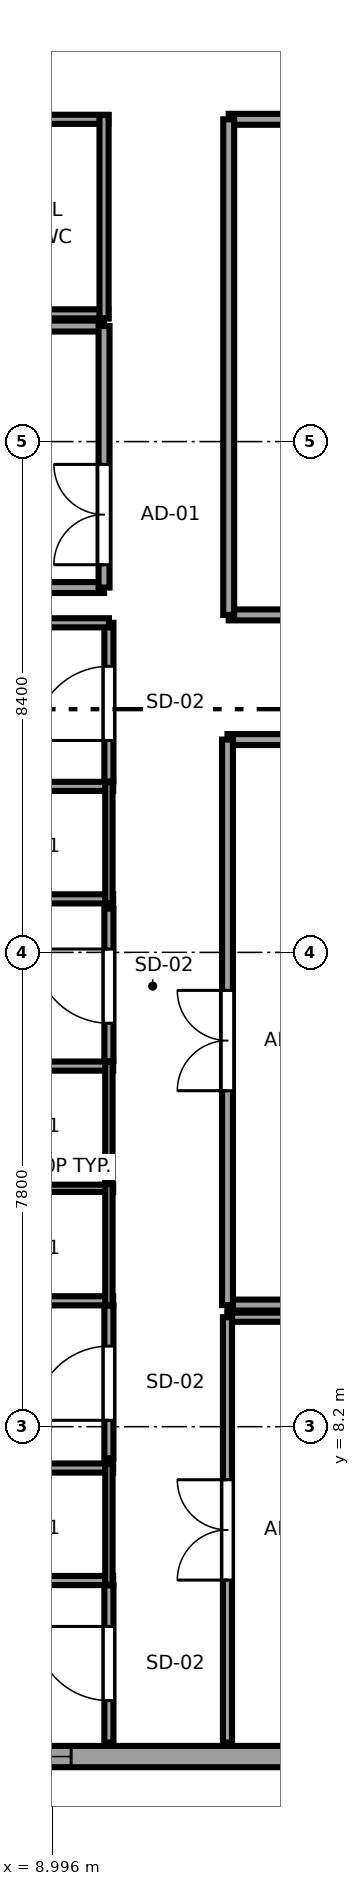
"""IFC4 building model, lengths in metres.
Left out: names, types, materials, properties, quantities, classifications, styles, units other than length and angle.
Written with IfcOpenShell. Run it as: python <this file> out.ifc"""

import sys

from ifc_helpers import new_model, si_unit, direction, frame, frame_2d, origin, place, context, subcontext, project, spatial, rectangle, extrude, source, transform, mapped, element, fill, save


model = new_model("IFC4")
c1 = context("Model", 3, precision=1e-05, world=origin(), true_north=direction((0.0, 1.0)))
c2 = subcontext(c1, "Body", "Model", "MODEL_VIEW")
j1 = project(units=[si_unit("LENGTHUNIT", "METRE"), si_unit("PLANEANGLEUNIT", "RADIAN")], contexts=[c1])
p1 = place(None, origin())
s1 = spatial("IfcSite", under=j1, at=p1, CompositionType="ELEMENT")
p2 = place(p1, origin())
s2 = spatial("IfcBuilding", under=s1, at=p2, CompositionType="ELEMENT")
p3 = place(p2, frame((0.0, 0.0, 241.65)))
s3 = spatial("IfcBuildingStorey", under=s2, at=p3, CompositionType="ELEMENT", Elevation=241.65)
p4 = place(p3, frame((7.017, 2.775, 0.0), z_axis=(0.0, 0.0, 1.0), x_axis=(1.0, 0.0, 0.0)))
e1 = element("IfcWall", 1, at=p4, inside=s3, PredefinedType="SOLIDWALL", context=c2, shape_type="SweptSolid", body=[
    extrude(rectangle(XDim=8.008, YDim=0.35, at=frame_2d((4.004, 0.0))), origin(), (0.0, 0.0, 1.0), 3.37),
])
p5 = place(p4, frame((0.791, 0.0, 0.62)))
e2 = element("IfcOpeningElement", 2, at=p5, cuts=e1, PredefinedType="OPENING", context=c2, shape_type="SweptSolid", body=[
    extrude(rectangle(XDim=1.5, YDim=1.55, at=frame_2d((0.75, 0.775))), frame((0.0, 0.185, 0.0), z_axis=(0.0, -1.0, 0.0), x_axis=(1.0, 0.0, 0.0)), (0.0, 0.0, 1.0), 0.37),
])
for number, where, z_axis, x_axis in (
    (3, (7.41, 5.67, 0.0), (0.0, 0.0, 1.0), (1.0, 0.0, 0.0)),
    (4, (7.41, 7.52, 0.0), (0.0, 0.0, 1.0), (1.0, 0.0, 0.0)),
):
    element("IfcWall", number, at=place(p3, frame(where, z_axis=z_axis, x_axis=x_axis)), inside=s3, PredefinedType="PARTITIONING", context=c2, shape_type="SweptSolid", body=[
        extrude(rectangle(XDim=2.59, YDim=0.15, at=frame_2d((1.295, 0.0))), origin(), (0.0, 0.0, 1.0), 3.37),
    ])
p6 = place(p3, frame((9.93, 5.6, 0.0), z_axis=(0.0, 0.0, 1.0), x_axis=(0.0, 1.0, 0.0)))
e5 = element("IfcWall", 5, at=p6, inside=s3, PredefinedType="PLUMBINGWALL", context=c2, shape_type="SweptSolid", body=[
    extrude(rectangle(XDim=1.99, YDim=0.12, at=frame_2d((0.995, 0.0))), origin(), (0.0, 0.0, 1.0), 3.37),
])
p7 = place(p3, frame((7.41, 10.27, 0.0), z_axis=(0.0, 0.0, 1.0), x_axis=(1.0, 0.0, 0.0)))
e6 = element("IfcWall", 6, at=p7, inside=s3, PredefinedType="PARTITIONING", context=c2, shape_type="SweptSolid", body=[
    extrude(rectangle(XDim=2.59, YDim=0.15, at=frame_2d((1.295, 0.0))), origin(), (0.0, 0.0, 1.0), 3.37),
])
p8 = place(p3, frame((7.41, 12.12, 0.0), z_axis=(0.0, 0.0, 1.0), x_axis=(1.0, 0.0, 0.0)))
e7 = element("IfcWall", 7, at=p8, inside=s3, PredefinedType="PLUMBINGWALL", context=c2, shape_type="SweptSolid", body=[
    extrude(rectangle(XDim=2.59, YDim=0.12, at=frame_2d((1.295, 0.0))), origin(), (0.0, 0.0, 1.0), 3.37),
])
p9 = place(p3, frame((9.93, 10.2, 0.0), z_axis=(0.0, 0.0, 1.0), x_axis=(0.0, 1.0, 0.0)))
e8 = element("IfcWall", 8, at=p9, inside=s3, PredefinedType="PLUMBINGWALL", context=c2, shape_type="SweptSolid", body=[
    extrude(rectangle(XDim=1.99, YDim=0.12, at=frame_2d((0.995, 0.0))), origin(), (0.0, 0.0, 1.0), 3.37),
])
p10 = place(p3, frame((7.41, 14.13, 0.0), z_axis=(0.0, 0.0, 1.0), x_axis=(1.0, 0.0, 0.0)))
e9 = element("IfcWall", 9, at=p10, inside=s3, PredefinedType="PARTITIONING", context=c2, shape_type="SweptSolid", body=[
    extrude(rectangle(XDim=2.59, YDim=0.15, at=frame_2d((1.295, 0.0))), origin(), (0.0, 0.0, 1.0), 3.37),
])
p11 = place(p3, frame((9.93, 12.21, 0.0), z_axis=(0.0, 0.0, 1.0), x_axis=(0.0, 1.0, 0.0)))
e10 = element("IfcWall", 10, at=p11, inside=s3, PredefinedType="PLUMBINGWALL", context=c2, shape_type="SweptSolid", body=[
    extrude(rectangle(XDim=1.99, YDim=0.12, at=frame_2d((0.995, 0.0))), origin(), (0.0, 0.0, 1.0), 3.37),
])
p12 = place(p3, frame((3.005, 16.88, 0.0), z_axis=(0.0, 0.0, 1.0), x_axis=(1.0, 0.0, 0.0)))
e11 = element("IfcWall", 11, at=p12, inside=s3, PredefinedType="PARTITIONING", context=c2, shape_type="SweptSolid", body=[
    extrude(rectangle(XDim=6.995, YDim=0.15, at=frame_2d((3.498, 0.0))), origin(), (0.0, 0.0, 1.0), 3.37),
])
p13 = place(p3, frame((7.41, 18.73, 0.0), z_axis=(0.0, 0.0, 1.0), x_axis=(1.0, 0.0, 0.0)))
e12 = element("IfcWall", 12, at=p13, inside=s3, PredefinedType="PARTITIONING", context=c2, shape_type="SweptSolid", body=[
    extrude(rectangle(XDim=2.59, YDim=0.15, at=frame_2d((1.295, 0.0))), origin(), (0.0, 0.0, 1.0), 3.37),
])
p14 = place(p3, frame((9.93, 16.81, 0.0), z_axis=(0.0, 0.0, 1.0), x_axis=(0.0, 1.0, 0.0)))
e13 = element("IfcWall", 13, at=p14, inside=s3, PredefinedType="PLUMBINGWALL", context=c2, shape_type="SweptSolid", body=[
    extrude(rectangle(XDim=1.99, YDim=0.12, at=frame_2d((0.995, 0.0))), origin(), (0.0, 0.0, 1.0), 3.37),
])
p15 = place(p3, frame((9.93, 3.005, 0.0), z_axis=(0.0, 0.0, 1.0), x_axis=(0.0, 1.0, 0.0)))
e14 = element("IfcWall", 14, at=p15, inside=s3, PredefinedType="PARTITIONING", context=c2, shape_type="SweptSolid", body=[
    extrude(rectangle(XDim=2.585, YDim=0.15, at=frame_2d((1.292, 0.0))), origin(), (0.0, 0.0, 1.0), 3.37),
])
p16 = place(p15, frame((0.69, 0.0, 0.0)))
e15 = element("IfcOpeningElement", 15, at=p16, cuts=e14, PredefinedType="OPENING", context=c2, shape_type="SweptSolid", body=[
    extrude(rectangle(XDim=1.22, YDim=2.08, at=frame_2d((0.61, 1.04))), frame((0.0, 0.085, 0.0), z_axis=(0.0, -1.0, 0.0), x_axis=(1.0, 0.0, 0.0)), (0.0, 0.0, 1.0), 0.17),
])
p17 = place(p3, frame((9.93, 7.68, 0.0), z_axis=(0.0, 0.0, 1.0), x_axis=(0.0, 1.0, 0.0)))
e16 = element("IfcWall", 16, at=p17, inside=s3, PredefinedType="PARTITIONING", context=c2, shape_type="SweptSolid", body=[
    extrude(rectangle(XDim=2.51, YDim=0.15, at=frame_2d((1.255, 0.0))), origin(), (0.0, 0.0, 1.0), 3.37),
])
p18 = place(p17, frame((0.625, 0.0, 0.0)))
e17 = element("IfcOpeningElement", 17, at=p18, cuts=e16, PredefinedType="OPENING", context=c2, shape_type="SweptSolid", body=[
    extrude(rectangle(XDim=1.22, YDim=2.08, at=frame_2d((0.61, 1.04))), frame((0.0, 0.085, 0.0), z_axis=(0.0, -1.0, 0.0), x_axis=(1.0, 0.0, 0.0)), (0.0, 0.0, 1.0), 0.17),
])
p19 = place(p3, frame((9.93, 14.21, 0.0), z_axis=(0.0, 0.0, 1.0), x_axis=(0.0, 1.0, 0.0)))
e18 = element("IfcWall", 18, at=p19, inside=s3, PredefinedType="PARTITIONING", context=c2, shape_type="SweptSolid", body=[
    extrude(rectangle(XDim=2.51, YDim=0.15, at=frame_2d((1.255, 0.0))), origin(), (0.0, 0.0, 1.0), 3.37),
])
p20 = place(p19, frame((0.625, 0.0, 0.0)))
e19 = element("IfcOpeningElement", 19, at=p20, cuts=e18, PredefinedType="OPENING", context=c2, shape_type="SweptSolid", body=[
    extrude(rectangle(XDim=1.22, YDim=2.08, at=frame_2d((0.61, 1.04))), frame((0.0, 0.085, 0.0), z_axis=(0.0, -1.0, 0.0), x_axis=(1.0, 0.0, 0.0)), (0.0, 0.0, 1.0), 0.17),
])
p21 = place(p3, frame((9.93, 18.81, 0.0), z_axis=(0.0, 0.0, 1.0), x_axis=(0.0, 1.0, 0.0)))
e20 = element("IfcWall", 20, at=p21, inside=s3, PredefinedType="PARTITIONING", context=c2, shape_type="SweptSolid", body=[
    extrude(rectangle(XDim=2.61, YDim=0.15, at=frame_2d((1.305, 0.0))), origin(), (0.0, 0.0, 1.0), 3.37),
])
p22 = place(p21, frame((0.675, 0.0, 0.0)))
e21 = element("IfcOpeningElement", 21, at=p22, cuts=e20, PredefinedType="OPENING", context=c2, shape_type="SweptSolid", body=[
    extrude(rectangle(XDim=1.22, YDim=2.08, at=frame_2d((0.61, 1.04))), frame((0.0, 0.085, 0.0), z_axis=(0.0, -1.0, 0.0), x_axis=(1.0, 0.0, 0.0)), (0.0, 0.0, 1.0), 0.17),
])
p23 = place(p3, frame((3.005, 21.42, 0.0), z_axis=(0.0, 0.0, 1.0), x_axis=(1.0, 0.0, 0.0)))
e22 = element("IfcWall", 22, at=p23, inside=s3, PredefinedType="PARTITIONING", context=c2, shape_type="SweptSolid", body=[
    extrude(rectangle(XDim=6.925, YDim=0.15, at=frame_2d((3.462, 0.0))), origin(), (0.0, 0.0, 1.0), 3.37),
])
for number, where, z_axis, x_axis in (
    (23, (11.88, 10.2, 0.0), (0.0, 0.0, 1.0), (1.0, 0.0, 0.0)),
    (24, (11.88, 19.5, 0.0), (0.0, 0.0, 1.0), (1.0, 0.0, 0.0)),
):
    element("IfcWall", number, at=place(p3, frame(where, z_axis=z_axis, x_axis=x_axis)), inside=s3, PredefinedType="PARTITIONING", context=c2, shape_type="SweptSolid", body=[
        extrude(rectangle(XDim=2.915, YDim=0.18, at=frame_2d((1.458, 0.0))), origin(), (0.0, 0.0, 1.0), 3.37),
    ])
p24 = place(p3, frame((11.88, 10.2, 0.0), z_axis=(0.0, 0.0, 1.0), x_axis=(0.0, 1.0, 0.0)))
e25 = element("IfcWall", 25, at=p24, inside=s3, PredefinedType="PARTITIONING", context=c2, shape_type="SweptSolid", body=[
    extrude(rectangle(XDim=9.3, YDim=0.18, at=frame_2d((4.65, 0.0))), origin(), (0.0, 0.0, 1.0), 3.37),
])
p25 = place(p24, frame((3.525, 0.0, 0.0)))
e26 = element("IfcOpeningElement", 26, at=p25, cuts=e25, PredefinedType="OPENING", context=c2, shape_type="SweptSolid", body=[
    extrude(rectangle(XDim=1.65, YDim=2.15, at=frame_2d((0.825, 1.075))), frame((0.0, 0.1, 0.0), z_axis=(0.0, -1.0, 0.0), x_axis=(1.0, 0.0, 0.0)), (0.0, 0.0, 1.0), 0.2),
])
p26 = place(p3, frame((11.88, 10.0, 0.0), z_axis=(0.0, 0.0, 1.0), x_axis=(1.0, 0.0, 0.0)))
e27 = element("IfcWall", 27, at=p26, inside=s3, PredefinedType="PARTITIONING", context=c2, shape_type="SweptSolid", body=[
    extrude(rectangle(XDim=2.915, YDim=0.15, at=frame_2d((1.458, 0.0))), origin(), (0.0, 0.0, 1.0), 3.37),
])
p27 = place(p3, frame((11.88, 3.005, 0.0), z_axis=(0.0, 0.0, 1.0), x_axis=(0.0, 1.0, 0.0)))
e28 = element("IfcWall", 28, at=p27, inside=s3, PredefinedType="PARTITIONING", context=c2, shape_type="SweptSolid", body=[
    extrude(rectangle(XDim=6.995, YDim=0.15, at=frame_2d((3.498, 0.0))), origin(), (0.0, 0.0, 1.0), 3.37),
])
p28 = place(p27, frame((2.673, 0.0, 0.0)))
e29 = element("IfcOpeningElement", 29, at=p28, cuts=e28, PredefinedType="OPENING", context=c2, shape_type="SweptSolid", body=[
    extrude(rectangle(XDim=1.65, YDim=2.15, at=frame_2d((0.825, 1.075))), frame((0.0, 0.085, 0.0), z_axis=(0.0, -1.0, 0.0), x_axis=(1.0, 0.0, 0.0)), (0.0, 0.0, 1.0), 0.17),
])
p29 = place(p3, frame((11.9, 21.55, 0.0), z_axis=(0.0, 0.0, 1.0), x_axis=(1.0, 0.0, 0.0)))
e30 = element("IfcWall", 30, at=p29, inside=s3, PredefinedType="PARTITIONING", context=c2, shape_type="SweptSolid", body=[
    extrude(rectangle(XDim=10.3, YDim=0.18, at=frame_2d((5.15, 0.0))), origin(), (0.0, 0.0, 1.0), 3.37),
])
p30 = place(p29, frame((4.325, 0.0, 0.0)))
e31 = element("IfcOpeningElement", 31, at=p30, cuts=e30, PredefinedType="OPENING", context=c2, shape_type="SweptSolid", body=[
    extrude(rectangle(XDim=1.65, YDim=2.15, at=frame_2d((0.825, 1.075))), frame((0.0, 0.1, 0.0), z_axis=(0.0, -1.0, 0.0), x_axis=(1.0, 0.0, 0.0)), (0.0, 0.0, 1.0), 0.2),
])
p31 = place(p3, frame((11.9, 29.7, 0.0), z_axis=(0.0, 0.0, 1.0), x_axis=(1.0, 0.0, 0.0)))
e32 = element("IfcWall", 32, at=p31, inside=s3, PredefinedType="PARTITIONING", context=c2, shape_type="SweptSolid", body=[
    extrude(rectangle(XDim=10.3, YDim=0.18, at=frame_2d((5.15, 0.0))), origin(), (0.0, 0.0, 1.0), 3.37),
])
p32 = place(p3, frame((11.9, 21.55, 0.0), z_axis=(0.0, 0.0, 1.0), x_axis=(0.0, 1.0, 0.0)))
e33 = element("IfcWall", 33, at=p32, inside=s3, PredefinedType="PARTITIONING", context=c2, shape_type="SweptSolid", body=[
    extrude(rectangle(XDim=8.15, YDim=0.18, at=frame_2d((4.075, 0.0))), origin(), (0.0, 0.0, 1.0), 3.37),
])
for number, where, z_axis, x_axis in (
    (34, (3.005, 22.0, 0.0), (0.0, 0.0, 1.0), (1.0, 0.0, 0.0)),
    (35, (3.005, 26.3, 0.0), (0.0, 0.0, 1.0), (1.0, 0.0, 0.0)),
):
    element("IfcWall", number, at=place(p3, frame(where, z_axis=z_axis, x_axis=x_axis)), inside=s3, PredefinedType="PARTITIONING", context=c2, shape_type="SweptSolid", body=[
        extrude(rectangle(XDim=6.845, YDim=0.18, at=frame_2d((3.423, 0.0))), origin(), (0.0, 0.0, 1.0), 3.37),
    ])
p33 = place(p3, frame((9.85, 22.0, 0.0), z_axis=(0.0, 0.0, 1.0), x_axis=(0.0, 1.0, 0.0)))
e36 = element("IfcWall", 36, at=p33, inside=s3, PredefinedType="PARTITIONING", context=c2, shape_type="SweptSolid", body=[
    extrude(rectangle(XDim=4.3, YDim=0.18, at=frame_2d((2.15, 0.0))), origin(), (0.0, 0.0, 1.0), 3.37),
])
p34 = place(p33, frame((0.375, 0.0, 0.0)))
e37 = element("IfcOpeningElement", 37, at=p34, cuts=e36, PredefinedType="OPENING", context=c2, shape_type="SweptSolid", body=[
    extrude(rectangle(XDim=1.65, YDim=2.15, at=frame_2d((0.825, 1.075))), frame((0.0, 0.1, 0.0), z_axis=(0.0, -1.0, 0.0), x_axis=(1.0, 0.0, 0.0)), (0.0, 0.0, 1.0), 0.2),
])
p35 = place(p3, frame((6.13, 26.5, 0.0), z_axis=(0.0, 0.0, 1.0), x_axis=(1.0, 0.0, 0.0)))
e38 = element("IfcWall", 38, at=p35, inside=s3, PredefinedType="PARTITIONING", context=c2, shape_type="SweptSolid", body=[
    extrude(rectangle(XDim=3.79, YDim=0.15, at=frame_2d((1.895, 0.0))), origin(), (0.0, 0.0, 1.0), 3.37),
])
p36 = place(p3, frame((6.13, 29.7, 0.0), z_axis=(0.0, 0.0, 1.0), x_axis=(1.0, 0.0, 0.0)))
e39 = element("IfcWall", 39, at=p36, inside=s3, PredefinedType="PARTITIONING", context=c2, shape_type="SweptSolid", body=[
    extrude(rectangle(XDim=3.79, YDim=0.15, at=frame_2d((1.895, 0.0))), origin(), (0.0, 0.0, 1.0), 3.37),
])
p37 = place(p36, frame((1.435, 0.0, 0.0)))
e40 = element("IfcOpeningElement", 40, at=p37, cuts=e39, PredefinedType="OPENING", context=c2, shape_type="SweptSolid", body=[
    extrude(rectangle(XDim=0.92, YDim=2.01, at=frame_2d((0.46, 1.005))), frame((0.0, 0.085, 0.0), z_axis=(0.0, -1.0, 0.0), x_axis=(1.0, 0.0, 0.0)), (0.0, 0.0, 1.0), 0.17),
])
p38 = place(p3, frame((9.85, 26.43, 0.0), z_axis=(0.0, 0.0, 1.0), x_axis=(0.0, 1.0, 0.0)))
e41 = element("IfcWall", 41, at=p38, inside=s3, PredefinedType="PARTITIONING", context=c2, shape_type="SweptSolid", body=[
    extrude(rectangle(XDim=3.34, YDim=0.15, at=frame_2d((1.67, 0.0))), origin(), (0.0, 0.0, 1.0), 3.37),
])
m1 = source(origin(), c2, "Body", "SweptSolid", [
    extrude(rectangle(XDim=1.5, YDim=1.55, at=frame_2d((0.75, 0.775))), frame((0.0, 0.09, 0.0), z_axis=(0.0, -1.0, 0.0), x_axis=(1.0, 0.0, 0.0)), (0.0, 0.0, 1.0), 0.06),
])
p39 = place(p5, origin())
e42 = element("IfcWindow", 42, at=p39, inside=s3, PartitioningType="SINGLE_PANEL", PredefinedType="WINDOW", context=c2, shape_type="MappedRepresentation", body=[
    mapped(m1, transform((0.0, 0.0, 0.0), x_axis=(1.0, 0.0, 0.0), y_axis=(0.0, 1.0, 0.0), z_axis=(0.0, 0.0, 1.0), scale=1.0)),
])
fill(e2, e42)
m2 = source(origin(), c2, "Body", "SweptSolid", [
    extrude(rectangle(XDim=1.22, YDim=2.08, at=frame_2d((0.61, 1.04))), frame((0.0, 0.025, 0.0), z_axis=(0.0, -1.0, 0.0), x_axis=(1.0, 0.0, 0.0)), (0.0, 0.0, 1.0), 0.05),
])
p40 = place(p16, origin())
e43 = element("IfcDoor", 43, at=p40, inside=s3, OperationType="SINGLE_SWING_RIGHT", PredefinedType="DOOR", context=c2, shape_type="MappedRepresentation", body=[
    mapped(m2, transform((0.0, 0.0, 0.0), x_axis=(1.0, 0.0, 0.0), y_axis=(0.0, 1.0, 0.0), z_axis=(0.0, 0.0, 1.0), scale=1.0)),
])
fill(e15, e43)
p41 = place(p18, origin())
e44 = element("IfcDoor", 44, at=p41, inside=s3, OperationType="SINGLE_SWING_LEFT", PredefinedType="DOOR", context=c2, shape_type="MappedRepresentation", body=[
    mapped(m2, transform((0.0, 0.0, 0.0), x_axis=(1.0, 0.0, 0.0), y_axis=(0.0, 1.0, 0.0), z_axis=(0.0, 0.0, 1.0), scale=1.0)),
])
fill(e17, e44)
p42 = place(p20, origin())
e45 = element("IfcDoor", 45, at=p42, inside=s3, OperationType="SINGLE_SWING_RIGHT", PredefinedType="DOOR", context=c2, shape_type="MappedRepresentation", body=[
    mapped(m2, transform((0.0, 0.0, 0.0), x_axis=(1.0, 0.0, 0.0), y_axis=(0.0, 1.0, 0.0), z_axis=(0.0, 0.0, 1.0), scale=1.0)),
])
fill(e19, e45)
p43 = place(p22, origin())
e46 = element("IfcDoor", 46, at=p43, inside=s3, OperationType="SINGLE_SWING_LEFT", PredefinedType="DOOR", context=c2, shape_type="MappedRepresentation", body=[
    mapped(m2, transform((0.0, 0.0, 0.0), x_axis=(1.0, 0.0, 0.0), y_axis=(0.0, 1.0, 0.0), z_axis=(0.0, 0.0, 1.0), scale=1.0)),
])
fill(e21, e46)
m3 = source(origin(), c2, "Body", "SweptSolid", [
    extrude(rectangle(XDim=1.65, YDim=2.15, at=frame_2d((0.825, 1.075))), frame((0.0, 0.025, 0.0), z_axis=(0.0, -1.0, 0.0), x_axis=(1.0, 0.0, 0.0)), (0.0, 0.0, 1.0), 0.05),
])
p44 = place(p25, origin())
e47 = element("IfcDoor", 47, at=p44, inside=s3, OperationType="DOUBLE_DOOR_SINGLE_SWING", PredefinedType="DOOR", context=c2, shape_type="MappedRepresentation", body=[
    mapped(m3, transform((0.0, 0.0, 0.0), x_axis=(1.0, 0.0, 0.0), y_axis=(0.0, 1.0, 0.0), z_axis=(0.0, 0.0, 1.0), scale=1.0)),
])
fill(e26, e47)
p45 = place(p28, origin())
e48 = element("IfcDoor", 48, at=p45, inside=s3, OperationType="DOUBLE_DOOR_SINGLE_SWING", PredefinedType="DOOR", context=c2, shape_type="MappedRepresentation", body=[
    mapped(m3, transform((0.0, 0.0, 0.0), x_axis=(1.0, 0.0, 0.0), y_axis=(0.0, 1.0, 0.0), z_axis=(0.0, 0.0, 1.0), scale=1.0)),
])
fill(e29, e48)
p46 = place(p34, origin())
e49 = element("IfcDoor", 49, at=p46, inside=s3, OperationType="DOUBLE_DOOR_SINGLE_SWING", PredefinedType="DOOR", context=c2, shape_type="MappedRepresentation", body=[
    mapped(m3, transform((0.0, 0.0, 0.0), x_axis=(1.0, 0.0, 0.0), y_axis=(0.0, 1.0, 0.0), z_axis=(0.0, 0.0, 1.0), scale=1.0)),
])
fill(e37, e49)
save(model, sys.argv[1])
